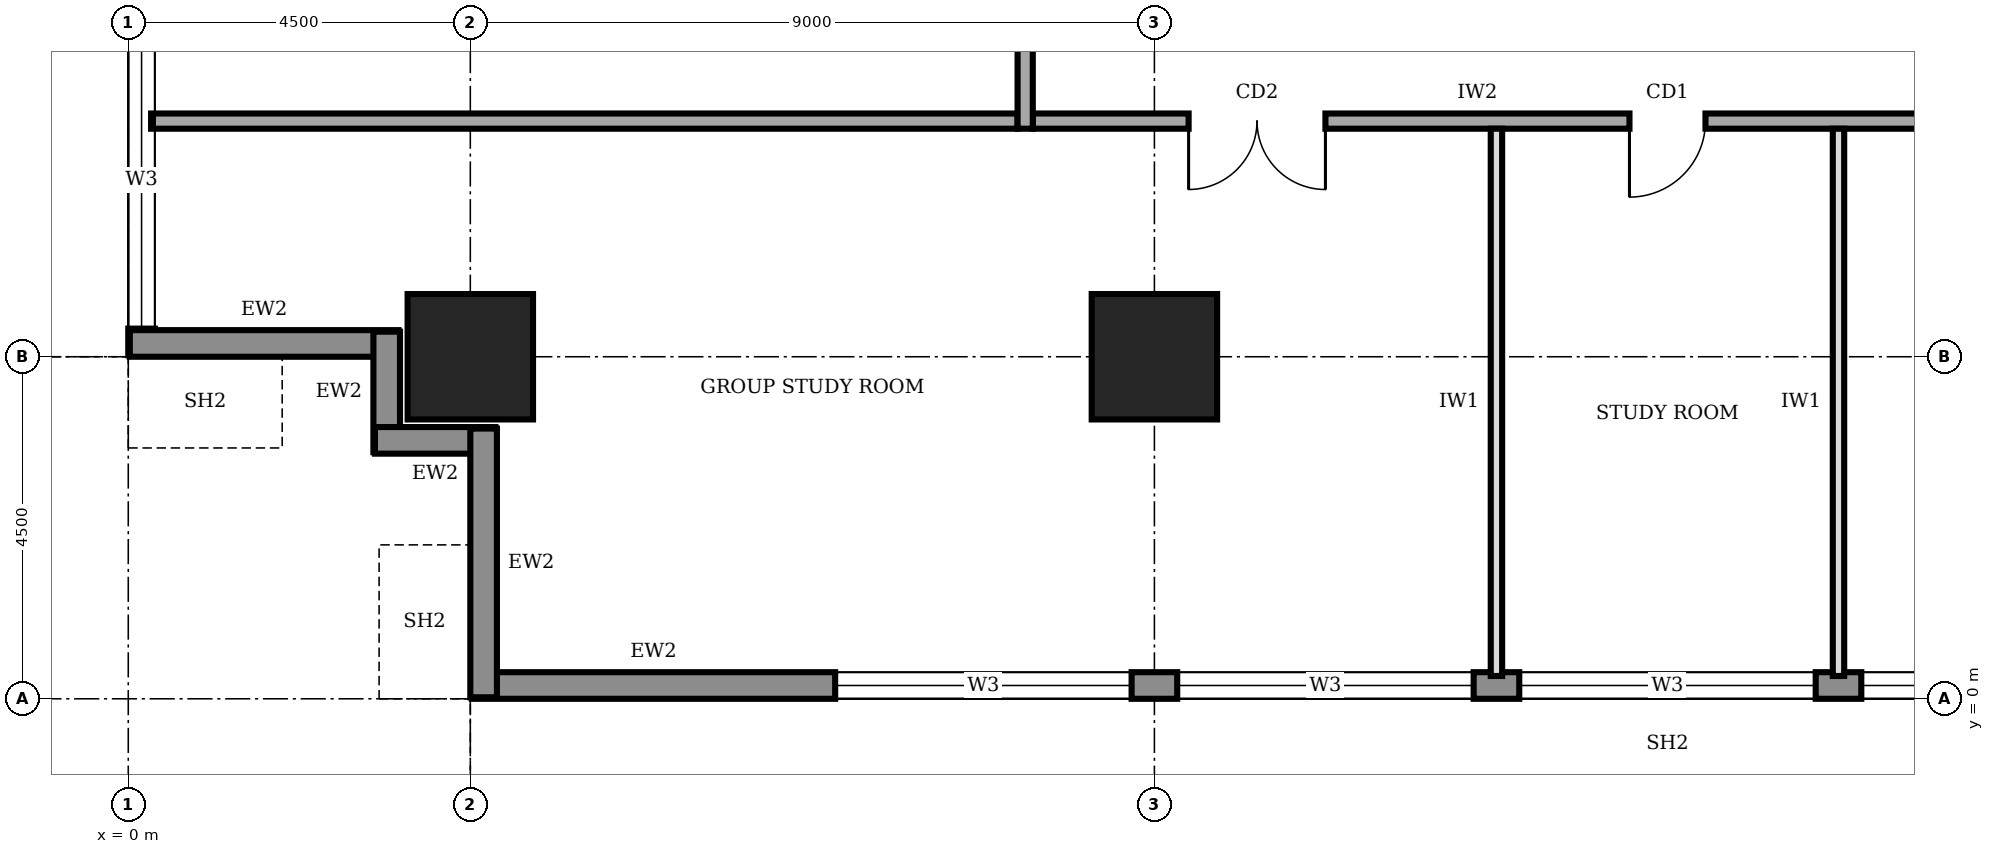
"""IFC4 building model, lengths in metres.
Left out: names, types, materials, properties, quantities, classifications, styles, units other than length and angle.
Written with IfcOpenShell. Run it as: python <this file> out.ifc"""

import sys

from ifc_helpers import new_model, si_unit, direction, frame, frame_2d, origin, origin_2d, place, context, subcontext, project, spatial, rectangle, extrude, element, fill, save


model = new_model("IFC4")
c1 = context("Model", 3, precision=1e-05, world=origin(), true_north=direction((0.0, 1.0)))
c2 = subcontext(c1, "Body", "Model", "MODEL_VIEW")
j1 = project(units=[si_unit("LENGTHUNIT", "METRE"), si_unit("PLANEANGLEUNIT", "RADIAN")], contexts=[c1])
p1 = place(None, origin())
s1 = spatial("IfcSite", under=j1, at=p1, CompositionType="ELEMENT")
p2 = place(p1, origin())
s2 = spatial("IfcBuilding", under=s1, at=p2, CompositionType="ELEMENT")
p3 = place(p2, frame((0.0, 0.0, 189.0)))
s3 = spatial("IfcBuildingStorey", under=s2, at=p3, CompositionType="ELEMENT", Elevation=189.0)
for number, where, z_axis, x_axis in (
    (1, (4.5, 4.5, 0.0), (0.0, 0.0, 1.0), (1.0, 0.0, 0.0)),
    (2, (13.5, 4.5, 0.0), (0.0, 0.0, 1.0), (1.0, 0.0, 0.0)),
):
    element("IfcColumn", number, at=place(p3, frame(where, z_axis=z_axis, x_axis=x_axis)), inside=s3, PredefinedType="COLUMN", context=c2, shape_type="SweptSolid", body=[
        extrude(rectangle(XDim=1.65, YDim=1.65, at=origin_2d()), origin(), (0.0, 0.0, 1.0), 4.0),
    ])
p4 = place(p3, frame((4.52, 0.175, 0.0), z_axis=(0.0, 0.0, 1.0), x_axis=(1.0, 0.0, 0.0)))
e3 = element("IfcWall", 3, at=p4, inside=s3, PredefinedType="STANDARD", context=c2, shape_type="SweptSolid", body=[
    extrude(rectangle(XDim=31.46, YDim=0.35, at=frame_2d((15.73, 0.0))), origin(), (0.0, 0.0, 1.0), 3.75),
])
p5 = place(p4, frame((4.78, 0.0, 0.95)))
e4 = element("IfcOpeningElement", 4, at=p5, cuts=e3, PredefinedType="OPENING", context=c2, shape_type="SweptSolid", body=[
    extrude(rectangle(XDim=3.9, YDim=1.8, at=frame_2d((1.95, 0.9))), frame((0.0, 0.185, 0.0), z_axis=(0.0, -1.0, 0.0), x_axis=(1.0, 0.0, 0.0)), (0.0, 0.0, 1.0), 0.37),
])
p6 = place(p4, frame((9.28, 0.0, 0.95)))
e5 = element("IfcOpeningElement", 5, at=p6, cuts=e3, PredefinedType="OPENING", context=c2, shape_type="SweptSolid", body=[
    extrude(rectangle(XDim=3.9, YDim=1.8, at=frame_2d((1.95, 0.9))), frame((0.0, 0.185, 0.0), z_axis=(0.0, -1.0, 0.0), x_axis=(1.0, 0.0, 0.0)), (0.0, 0.0, 1.0), 0.37),
])
p7 = place(p4, frame((13.78, 0.0, 0.95)))
e6 = element("IfcOpeningElement", 6, at=p7, cuts=e3, PredefinedType="OPENING", context=c2, shape_type="SweptSolid", body=[
    extrude(rectangle(XDim=3.9, YDim=1.8, at=frame_2d((1.95, 0.9))), frame((0.0, 0.185, 0.0), z_axis=(0.0, -1.0, 0.0), x_axis=(1.0, 0.0, 0.0)), (0.0, 0.0, 1.0), 0.37),
])
p8 = place(p4, frame((18.28, 0.0, 0.95)))
e7 = element("IfcOpeningElement", 7, at=p8, cuts=e3, PredefinedType="OPENING", context=c2, shape_type="SweptSolid", body=[
    extrude(rectangle(XDim=3.9, YDim=1.8, at=frame_2d((1.95, 0.9))), frame((0.0, 0.185, 0.0), z_axis=(0.0, -1.0, 0.0), x_axis=(1.0, 0.0, 0.0)), (0.0, 0.0, 1.0), 0.37),
])
p9 = place(p4, frame((22.78, 0.0, 0.95)))
e8 = element("IfcOpeningElement", 8, at=p9, cuts=e3, PredefinedType="OPENING", context=c2, shape_type="SweptSolid", body=[
    extrude(rectangle(XDim=3.9, YDim=1.8, at=frame_2d((1.95, 0.9))), frame((0.0, 0.185, 0.0), z_axis=(0.0, -1.0, 0.0), x_axis=(1.0, 0.0, 0.0)), (0.0, 0.0, 1.0), 0.37),
])
p10 = place(p4, frame((27.21, 0.0, 0.95)))
e9 = element("IfcOpeningElement", 9, at=p10, cuts=e3, PredefinedType="OPENING", context=c2, shape_type="SweptSolid", body=[
    extrude(rectangle(XDim=3.9, YDim=1.8, at=frame_2d((1.95, 0.9))), frame((0.0, 0.185, 0.0), z_axis=(0.0, -1.0, 0.0), x_axis=(1.0, 0.0, 0.0)), (0.0, 0.0, 1.0), 0.37),
])
p11 = place(p3, frame((0.175, 35.98, 0.0), z_axis=(0.0, 0.0, 1.0), x_axis=(0.0, -1.0, 0.0)))
e10 = element("IfcWall", 10, at=p11, inside=s3, PredefinedType="STANDARD", context=c2, shape_type="SweptSolid", body=[
    extrude(rectangle(XDim=31.46, YDim=0.35, at=frame_2d((15.73, 0.0))), origin(), (0.0, 0.0, 1.0), 3.75),
])
p12 = place(p11, frame((27.21, 0.0, 0.95)))
e11 = element("IfcOpeningElement", 11, at=p12, cuts=e10, PredefinedType="OPENING", context=c2, shape_type="SweptSolid", body=[
    extrude(rectangle(XDim=3.9, YDim=1.8, at=frame_2d((1.95, 0.9))), frame((0.0, 0.185, 0.0), z_axis=(0.0, -1.0, 0.0), x_axis=(1.0, 0.0, 0.0)), (0.0, 0.0, 1.0), 0.37),
])
p13 = place(p11, frame((22.78, 0.0, 0.95)))
e12 = element("IfcOpeningElement", 12, at=p13, cuts=e10, PredefinedType="OPENING", context=c2, shape_type="SweptSolid", body=[
    extrude(rectangle(XDim=3.9, YDim=1.8, at=frame_2d((1.95, 0.9))), frame((0.0, 0.185, 0.0), z_axis=(0.0, -1.0, 0.0), x_axis=(1.0, 0.0, 0.0)), (0.0, 0.0, 1.0), 0.37),
])
p14 = place(p11, frame((18.28, 0.0, 0.95)))
e13 = element("IfcOpeningElement", 13, at=p14, cuts=e10, PredefinedType="OPENING", context=c2, shape_type="SweptSolid", body=[
    extrude(rectangle(XDim=3.9, YDim=1.8, at=frame_2d((1.95, 0.9))), frame((0.0, 0.185, 0.0), z_axis=(0.0, -1.0, 0.0), x_axis=(1.0, 0.0, 0.0)), (0.0, 0.0, 1.0), 0.37),
])
p15 = place(p11, frame((13.78, 0.0, 0.95)))
e14 = element("IfcOpeningElement", 14, at=p15, cuts=e10, PredefinedType="OPENING", context=c2, shape_type="SweptSolid", body=[
    extrude(rectangle(XDim=3.9, YDim=1.8, at=frame_2d((1.95, 0.9))), frame((0.0, 0.185, 0.0), z_axis=(0.0, -1.0, 0.0), x_axis=(1.0, 0.0, 0.0)), (0.0, 0.0, 1.0), 0.37),
])
p16 = place(p11, frame((9.28, 0.0, 0.95)))
e15 = element("IfcOpeningElement", 15, at=p16, cuts=e10, PredefinedType="OPENING", context=c2, shape_type="SweptSolid", body=[
    extrude(rectangle(XDim=3.9, YDim=1.8, at=frame_2d((1.95, 0.9))), frame((0.0, 0.185, 0.0), z_axis=(0.0, -1.0, 0.0), x_axis=(1.0, 0.0, 0.0)), (0.0, 0.0, 1.0), 0.37),
])
p17 = place(p11, frame((4.78, 0.0, 0.95)))
e16 = element("IfcOpeningElement", 16, at=p17, cuts=e10, PredefinedType="OPENING", context=c2, shape_type="SweptSolid", body=[
    extrude(rectangle(XDim=3.9, YDim=1.8, at=frame_2d((1.95, 0.9))), frame((0.0, 0.185, 0.0), z_axis=(0.0, -1.0, 0.0), x_axis=(1.0, 0.0, 0.0)), (0.0, 0.0, 1.0), 0.37),
])
p18 = place(p3, frame((0.02, 4.675, 0.0), z_axis=(0.0, 0.0, 1.0), x_axis=(1.0, 0.0, 0.0)))
e17 = element("IfcWall", 17, at=p18, inside=s3, PredefinedType="STANDARD", context=c2, shape_type="SweptSolid", body=[
    extrude(rectangle(XDim=3.535, YDim=0.35, at=frame_2d((1.768, 0.0))), origin(), (0.0, 0.0, 1.0), 2.85),
])
for number, where, z_axis, x_axis in (
    (18, (3.4, 4.83, 0.0), (0.0, 0.0, 1.0), (0.0, -1.0, 0.0)),
    (19, (3.245, 3.4, 0.0), (0.0, 0.0, 1.0), (1.0, 0.0, 0.0)),
):
    element("IfcWall", number, at=place(p3, frame(where, z_axis=z_axis, x_axis=x_axis)), inside=s3, PredefinedType="STANDARD", context=c2, shape_type="SweptSolid", body=[
        extrude(rectangle(XDim=1.585, YDim=0.35, at=frame_2d((0.792, 0.0))), origin(), (0.0, 0.0, 1.0), 3.75),
    ])
p19 = place(p3, frame((4.675, 3.555, 0.0), z_axis=(0.0, 0.0, 1.0), x_axis=(0.0, -1.0, 0.0)))
e20 = element("IfcWall", 20, at=p19, inside=s3, PredefinedType="STANDARD", context=c2, shape_type="SweptSolid", body=[
    extrude(rectangle(XDim=3.535, YDim=0.35, at=frame_2d((1.768, 0.0))), origin(), (0.0, 0.0, 1.0), 2.85),
])
p20 = place(p3, frame((11.9, 7.6, 0.0), z_axis=(0.0, 0.0, 1.0), x_axis=(1.0, 0.0, 0.0)))
e21 = element("IfcWall", 21, at=p20, inside=s3, PredefinedType="SOLIDWALL", context=c2, shape_type="SweptSolid", body=[
    extrude(rectangle(XDim=16.9, YDim=0.2, at=frame_2d((8.45, 0.0))), origin(), (0.0, 0.0, 1.0), 3.75),
])
p21 = place(p20, frame((2.05, 0.0, 0.0)))
e22 = element("IfcOpeningElement", 22, at=p21, cuts=e21, PredefinedType="OPENING", context=c2, shape_type="SweptSolid", body=[
    extrude(rectangle(XDim=1.8, YDim=2.1, at=frame_2d((0.9, 1.05))), frame((0.0, 0.11, 0.0), z_axis=(0.0, -1.0, 0.0), x_axis=(1.0, 0.0, 0.0)), (0.0, 0.0, 1.0), 0.22),
])
p22 = place(p20, frame((7.85, 0.0, 0.0)))
e23 = element("IfcOpeningElement", 23, at=p22, cuts=e21, PredefinedType="OPENING", context=c2, shape_type="SweptSolid", body=[
    extrude(rectangle(XDim=1.0, YDim=2.1, at=frame_2d((0.5, 1.05))), frame((0.0, 0.11, 0.0), z_axis=(0.0, -1.0, 0.0), x_axis=(1.0, 0.0, 0.0)), (0.0, 0.0, 1.0), 0.22),
])
p23 = place(p20, frame((12.85, 0.0, 0.0)))
e24 = element("IfcOpeningElement", 24, at=p23, cuts=e21, PredefinedType="OPENING", context=c2, shape_type="SweptSolid", body=[
    extrude(rectangle(XDim=1.8, YDim=2.1, at=frame_2d((0.9, 1.05))), frame((0.0, 0.11, 0.0), z_axis=(0.0, -1.0, 0.0), x_axis=(1.0, 0.0, 0.0)), (0.0, 0.0, 1.0), 0.22),
])
p24 = place(p3, frame((11.8, 32.8, 0.0), z_axis=(0.0, 0.0, 1.0), x_axis=(0.0, -1.0, 0.0)))
e25 = element("IfcWall", 25, at=p24, inside=s3, PredefinedType="SOLIDWALL", context=c2, shape_type="SweptSolid", body=[
    extrude(rectangle(XDim=25.3, YDim=0.2, at=frame_2d((12.65, 0.0))), origin(), (0.0, 0.0, 1.0), 3.75),
])
p25 = place(p24, frame((21.8, 0.0, 0.0)))
e26 = element("IfcOpeningElement", 26, at=p25, cuts=e25, PredefinedType="OPENING", context=c2, shape_type="SweptSolid", body=[
    extrude(rectangle(XDim=1.0, YDim=2.1, at=frame_2d((0.5, 1.05))), frame((0.0, 0.11, 0.0), z_axis=(0.0, -1.0, 0.0), x_axis=(1.0, 0.0, 0.0)), (0.0, 0.0, 1.0), 0.22),
])
p26 = place(p24, frame((17.15, 0.0, 0.0)))
e27 = element("IfcOpeningElement", 27, at=p26, cuts=e25, PredefinedType="OPENING", context=c2, shape_type="SweptSolid", body=[
    extrude(rectangle(XDim=0.9, YDim=2.1, at=frame_2d((0.45, 1.05))), frame((0.0, 0.11, 0.0), z_axis=(0.0, -1.0, 0.0), x_axis=(1.0, 0.0, 0.0)), (0.0, 0.0, 1.0), 0.22),
])
p27 = place(p24, frame((12.35, 0.0, 0.0)))
e28 = element("IfcOpeningElement", 28, at=p27, cuts=e25, PredefinedType="OPENING", context=c2, shape_type="SweptSolid", body=[
    extrude(rectangle(XDim=0.9, YDim=2.1, at=frame_2d((0.45, 1.05))), frame((0.0, 0.11, 0.0), z_axis=(0.0, -1.0, 0.0), x_axis=(1.0, 0.0, 0.0)), (0.0, 0.0, 1.0), 0.22),
])
p28 = place(p24, frame((9.3, 0.0, 0.0)))
e29 = element("IfcOpeningElement", 29, at=p28, cuts=e25, PredefinedType="OPENING", context=c2, shape_type="SweptSolid", body=[
    extrude(rectangle(XDim=0.9, YDim=2.1, at=frame_2d((0.45, 1.05))), frame((0.0, 0.11, 0.0), z_axis=(0.0, -1.0, 0.0), x_axis=(1.0, 0.0, 0.0)), (0.0, 0.0, 1.0), 0.22),
])
p29 = place(p24, frame((6.3, 0.0, 0.0)))
e30 = element("IfcOpeningElement", 30, at=p29, cuts=e25, PredefinedType="OPENING", context=c2, shape_type="SweptSolid", body=[
    extrude(rectangle(XDim=1.0, YDim=2.1, at=frame_2d((0.5, 1.05))), frame((0.0, 0.11, 0.0), z_axis=(0.0, -1.0, 0.0), x_axis=(1.0, 0.0, 0.0)), (0.0, 0.0, 1.0), 0.22),
])
p30 = place(p24, frame((14.4, 0.0, 0.0)))
e31 = element("IfcOpeningElement", 31, at=p30, cuts=e25, PredefinedType="OPENING", context=c2, shape_type="SweptSolid", body=[
    extrude(rectangle(XDim=1.0, YDim=2.1, at=frame_2d((0.5, 1.05))), frame((0.0, 0.11, 0.0), z_axis=(0.0, -1.0, 0.0), x_axis=(1.0, 0.0, 0.0)), (0.0, 0.0, 1.0), 0.22),
])
p31 = place(p24, frame((2.3, 0.0, 0.0)))
e32 = element("IfcOpeningElement", 32, at=p31, cuts=e25, PredefinedType="OPENING", context=c2, shape_type="SweptSolid", body=[
    extrude(rectangle(XDim=1.0, YDim=2.1, at=frame_2d((0.5, 1.05))), frame((0.0, 0.11, 0.0), z_axis=(0.0, -1.0, 0.0), x_axis=(1.0, 0.0, 0.0)), (0.0, 0.0, 1.0), 0.22),
])
p32 = place(p3, frame((0.3, 7.6, 0.0), z_axis=(0.0, 0.0, 1.0), x_axis=(1.0, 0.0, 0.0)))
e33 = element("IfcWall", 33, at=p32, inside=s3, PredefinedType="SOLIDWALL", context=c2, shape_type="SweptSolid", body=[
    extrude(rectangle(XDim=11.4, YDim=0.2, at=frame_2d((5.7, 0.0))), origin(), (0.0, 0.0, 1.0), 3.75),
])
for number, where, z_axis, x_axis in (
    (34, (18.0, 0.3, 0.0), (0.0, 0.0, 1.0), (0.0, 1.0, 0.0)),
    (35, (22.5, 0.3, 0.0), (0.0, 0.0, 1.0), (0.0, 1.0, 0.0)),
):
    element("IfcWall", number, at=place(p3, frame(where, z_axis=z_axis, x_axis=x_axis)), inside=s3, PredefinedType="PARTITIONING", context=c2, shape_type="SweptSolid", body=[
        extrude(rectangle(XDim=7.2, YDim=0.15, at=frame_2d((3.6, 0.0))), origin(), (0.0, 0.0, 1.0), 3.75),
    ])
p33 = place(p5, origin())
e36 = element("IfcWindow", 36, at=p33, inside=s3, PartitioningType="SINGLE_PANEL", PredefinedType="WINDOW", context=c2, shape_type="SweptSolid", body=[
    extrude(rectangle(XDim=3.9, YDim=1.8, at=frame_2d((1.95, 0.9))), frame((0.0, 0.03, 0.0), z_axis=(0.0, -1.0, 0.0), x_axis=(1.0, 0.0, 0.0)), (0.0, 0.0, 1.0), 0.06),
])
fill(e4, e36)
p34 = place(p6, origin())
e37 = element("IfcWindow", 37, at=p34, inside=s3, PartitioningType="SINGLE_PANEL", PredefinedType="WINDOW", context=c2, shape_type="SweptSolid", body=[
    extrude(rectangle(XDim=3.9, YDim=1.8, at=frame_2d((1.95, 0.9))), frame((0.0, 0.03, 0.0), z_axis=(0.0, -1.0, 0.0), x_axis=(1.0, 0.0, 0.0)), (0.0, 0.0, 1.0), 0.06),
])
fill(e5, e37)
p35 = place(p7, origin())
e38 = element("IfcWindow", 38, at=p35, inside=s3, PartitioningType="SINGLE_PANEL", PredefinedType="WINDOW", context=c2, shape_type="SweptSolid", body=[
    extrude(rectangle(XDim=3.9, YDim=1.8, at=frame_2d((1.95, 0.9))), frame((0.0, 0.03, 0.0), z_axis=(0.0, -1.0, 0.0), x_axis=(1.0, 0.0, 0.0)), (0.0, 0.0, 1.0), 0.06),
])
fill(e6, e38)
p36 = place(p8, origin())
e39 = element("IfcWindow", 39, at=p36, inside=s3, PartitioningType="SINGLE_PANEL", PredefinedType="WINDOW", context=c2, shape_type="SweptSolid", body=[
    extrude(rectangle(XDim=3.9, YDim=1.8, at=frame_2d((1.95, 0.9))), frame((0.0, 0.03, 0.0), z_axis=(0.0, -1.0, 0.0), x_axis=(1.0, 0.0, 0.0)), (0.0, 0.0, 1.0), 0.06),
])
fill(e7, e39)
p37 = place(p12, origin())
e40 = element("IfcWindow", 40, at=p37, inside=s3, PartitioningType="SINGLE_PANEL", PredefinedType="WINDOW", context=c2, shape_type="SweptSolid", body=[
    extrude(rectangle(XDim=3.9, YDim=1.8, at=frame_2d((1.95, 0.9))), frame((0.0, 0.03, 0.0), z_axis=(0.0, -1.0, 0.0), x_axis=(1.0, 0.0, 0.0)), (0.0, 0.0, 1.0), 0.06),
])
fill(e11, e40)
p38 = place(p21, frame((1.8, 0.0, 0.0), z_axis=(0.0, 0.0, 1.0), x_axis=(-1.0, 0.0, 0.0)))
e41 = element("IfcDoor", 41, at=p38, inside=s3, OperationType="DOUBLE_DOOR_SINGLE_SWING", PredefinedType="DOOR", context=c2, shape_type="SweptSolid", body=[
    extrude(rectangle(XDim=1.8, YDim=2.1, at=frame_2d((0.9, 1.05))), frame((0.0, 0.025, 0.0), z_axis=(0.0, -1.0, 0.0), x_axis=(1.0, 0.0, 0.0)), (0.0, 0.0, 1.0), 0.05),
])
fill(e22, e41)
p39 = place(p22, frame((1.0, 0.0, 0.0), z_axis=(0.0, 0.0, 1.0), x_axis=(-1.0, 0.0, 0.0)))
e42 = element("IfcDoor", 42, at=p39, inside=s3, OperationType="SINGLE_SWING_RIGHT", PredefinedType="DOOR", context=c2, shape_type="SweptSolid", body=[
    extrude(rectangle(XDim=1.0, YDim=2.1, at=frame_2d((0.5, 1.05))), frame((0.0, 0.025, 0.0), z_axis=(0.0, -1.0, 0.0), x_axis=(1.0, 0.0, 0.0)), (0.0, 0.0, 1.0), 0.05),
])
fill(e23, e42)
save(model, sys.argv[1])
